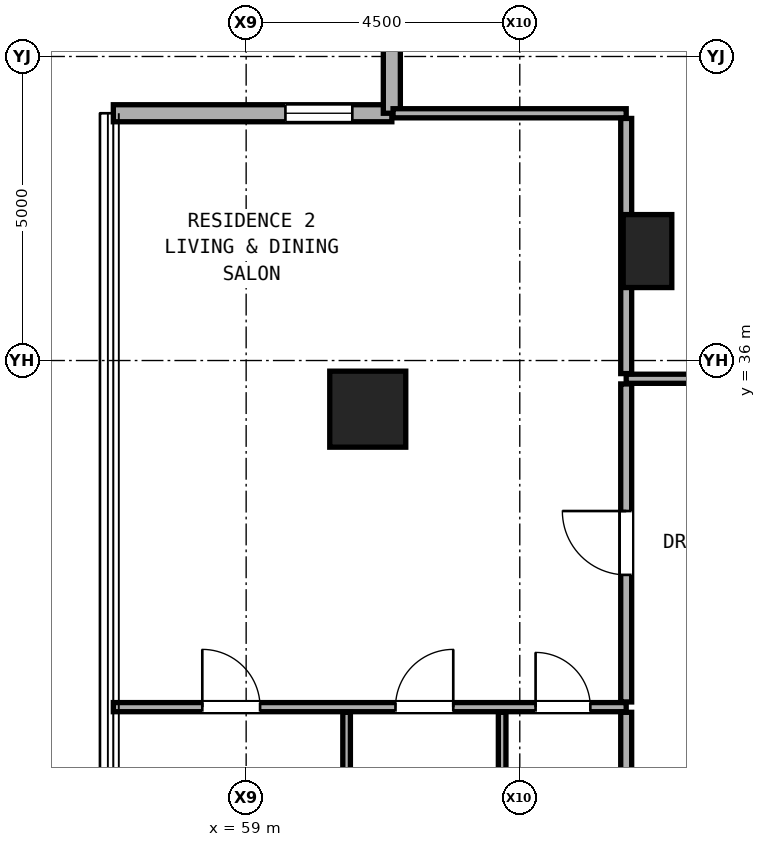
"""IFC4 building model, lengths in metres.
Left out: names, types, materials, properties, quantities, classifications, styles, units other than length and angle.
Written with IfcOpenShell. Run it as: python <this file> out.ifc"""

import sys

from ifc_helpers import new_model, si_unit, direction, frame, frame_2d, origin, origin_2d, place, context, subcontext, project, spatial, rectangle, hollow_rectangle, extrude, element, fill, save


model = new_model("IFC4")
c1 = context("Model", 3, precision=1e-05, world=origin(), true_north=direction((0.0, 1.0)))
c2 = subcontext(c1, "Body", "Model", "MODEL_VIEW")
j1 = project(units=[si_unit("LENGTHUNIT", "METRE"), si_unit("PLANEANGLEUNIT", "RADIAN")], contexts=[c1])
p1 = place(None, origin())
s1 = spatial("IfcSite", under=j1, at=p1, CompositionType="ELEMENT")
p2 = place(p1, origin())
s2 = spatial("IfcBuilding", under=s1, at=p2, CompositionType="ELEMENT")
p3 = place(p2, frame((0.0, 0.0, 48.8)))
s3 = spatial("IfcBuildingStorey", under=s2, at=p3, CompositionType="ELEMENT", Elevation=48.8)
p4 = place(p3, frame((61.0, 35.2, 0.0), z_axis=(0.0, 0.0, 1.0), x_axis=(1.0, 0.0, 0.0)))
e1 = element("IfcColumn", 1, at=p4, inside=s3, PredefinedType="COLUMN", context=c2, shape_type="SweptSolid", body=[
    extrude(hollow_rectangle(XDim=1.25, YDim=1.25, WallThickness=0.07, at=origin_2d()), origin(), (0.0, 0.0, 1.0), 3.3),
])
p5 = place(p3, frame((65.6, 37.8, 0.0), z_axis=(0.0, 0.0, 1.0), x_axis=(1.0, 0.0, 0.0)))
e2 = element("IfcColumn", 2, at=p5, inside=s3, PredefinedType="PILASTER", context=c2, shape_type="SweptSolid", body=[
    extrude(rectangle(XDim=0.8, YDim=1.2, at=origin_2d()), origin(), (0.0, 0.0, 1.0), 3.3),
])
p6 = place(p3, frame((61.396, 40.066, 0.0), z_axis=(0.0, 0.0, 1.0), x_axis=(-1.0, 0.0, 0.0)))
e3 = element("IfcWall", 3, at=p6, inside=s3, PredefinedType="SOLIDWALL", context=c2, shape_type="SweptSolid", body=[
    extrude(rectangle(XDim=4.58, YDim=0.28, at=frame_2d((2.29, 0.0))), origin(), (0.0, 0.0, 1.0), 3.04),
])
p7 = place(p6, frame((0.65, 0.0, 0.85)))
e4 = element("IfcOpeningElement", 4, at=p7, cuts=e3, PredefinedType="OPENING", context=c2, shape_type="SweptSolid", body=[
    extrude(rectangle(XDim=1.1, YDim=2.0, at=frame_2d((0.55, 1.0))), frame((0.0, 0.15, 0.0), z_axis=(0.0, -1.0, 0.0), x_axis=(1.0, 0.0, 0.0)), (0.0, 0.0, 1.0), 0.3),
])
p8 = place(p3, frame((61.396, 44.646, 0.0), z_axis=(0.0, 0.0, 1.0), x_axis=(0.0, -1.0, 0.0)))
e5 = element("IfcWall", 5, at=p8, inside=s3, PredefinedType="SOLIDWALL", context=c2, shape_type="SweptSolid", body=[
    extrude(rectangle(XDim=4.58, YDim=0.28, at=frame_2d((2.29, 0.0))), origin(), (0.0, 0.0, 1.0), 3.04),
])
p9 = place(p3, frame((56.816, 30.3, 0.0), z_axis=(0.0, 0.0, 1.0), x_axis=(1.0, 0.0, 0.0)))
e6 = element("IfcWall", 6, at=p9, inside=s3, PredefinedType="PARTITIONING", context=c2, shape_type="SweptSolid", body=[
    extrude(rectangle(XDim=8.434, YDim=0.15, at=frame_2d((4.217, 0.0))), origin(), (0.0, 0.0, 1.0), 2.196),
])
p10 = place(p9, frame((1.463, 0.0, 0.0)))
e7 = element("IfcOpeningElement", 7, at=p10, cuts=e6, PredefinedType="OPENING", context=c2, shape_type="SweptSolid", body=[
    extrude(rectangle(XDim=0.95, YDim=2.15, at=frame_2d((0.475, 1.075))), frame((0.0, 0.085, 0.0), z_axis=(0.0, -1.0, 0.0), x_axis=(1.0, 0.0, 0.0)), (0.0, 0.0, 1.0), 0.17),
])
p11 = place(p9, frame((4.64, 0.0, 0.0)))
e8 = element("IfcOpeningElement", 8, at=p11, cuts=e6, PredefinedType="OPENING", context=c2, shape_type="SweptSolid", body=[
    extrude(rectangle(XDim=0.95, YDim=2.15, at=frame_2d((0.475, 1.075))), frame((0.0, 0.085, 0.0), z_axis=(0.0, -1.0, 0.0), x_axis=(1.0, 0.0, 0.0)), (0.0, 0.0, 1.0), 0.17),
])
p12 = place(p9, frame((6.944, 0.0, 0.0)))
e9 = element("IfcOpeningElement", 9, at=p12, cuts=e6, PredefinedType="OPENING", context=c2, shape_type="SweptSolid", body=[
    extrude(rectangle(XDim=0.9, YDim=2.1, at=frame_2d((0.45, 1.05))), frame((0.0, 0.085, 0.0), z_axis=(0.0, -1.0, 0.0), x_axis=(1.0, 0.0, 0.0)), (0.0, 0.0, 1.0), 0.17),
])
p13 = place(p3, frame((65.25, 35.7, 0.0), z_axis=(0.0, 0.0, 1.0), x_axis=(1.0, 0.0, 0.0)))
e10 = element("IfcWall", 10, at=p13, inside=s3, PredefinedType="PARTITIONING", context=c2, shape_type="SweptSolid", body=[
    extrude(rectangle(XDim=1.37, YDim=0.15, at=frame_2d((0.685, 0.0))), origin(), (0.0, 0.0, 1.0), 3.06),
])
p14 = place(p3, frame((61.416, 40.066, 0.0), z_axis=(0.0, 0.0, 1.0), x_axis=(1.0, 0.0, 0.0)))
e11 = element("IfcWall", 11, at=p14, inside=s3, PredefinedType="PARTITIONING", context=c2, shape_type="SweptSolid", body=[
    extrude(rectangle(XDim=3.834, YDim=0.15, at=frame_2d((1.917, 0.0))), origin(), (0.0, 0.0, 1.0), 3.06),
])
p15 = place(p3, frame((60.652, 28.073, 0.0), z_axis=(0.0, 0.0, 1.0), x_axis=(0.0, 1.0, 0.0)))
e12 = element("IfcWall", 12, at=p15, inside=s3, PredefinedType="PARTITIONING", context=c2, shape_type="SweptSolid", body=[
    extrude(rectangle(XDim=2.143, YDim=0.125, at=frame_2d((1.071, 0.0))), origin(), (0.0, 0.0, 1.0), 3.06),
])
p16 = place(p3, frame((63.21, 28.073, 0.0), z_axis=(0.0, 0.0, 1.0), x_axis=(0.0, 1.0, 0.0)))
e13 = element("IfcWall", 13, at=p16, inside=s3, PredefinedType="PARTITIONING", context=c2, shape_type="SweptSolid", body=[
    extrude(rectangle(XDim=2.143, YDim=0.125, at=frame_2d((1.071, 0.0))), origin(), (0.0, 0.0, 1.0), 2.279),
])
p17 = place(p3, frame((65.25, 28.073, 0.0), z_axis=(0.0, 0.0, 1.0), x_axis=(0.0, 1.0, 0.0)))
e14 = element("IfcWall", 14, at=p17, inside=s3, PredefinedType="PARTITIONING", context=c2, shape_type="SweptSolid", body=[
    extrude(rectangle(XDim=2.143, YDim=0.18, at=frame_2d((1.071, 0.0))), origin(), (0.0, 0.0, 1.0), 2.279),
])
p18 = place(p3, frame((65.25, 30.385, 0.0), z_axis=(0.0, 0.0, 1.0), x_axis=(0.0, 1.0, 0.0)))
e15 = element("IfcWall", 15, at=p18, inside=s3, PredefinedType="PARTITIONING", context=c2, shape_type="SweptSolid", body=[
    extrude(rectangle(XDim=5.23, YDim=0.18, at=frame_2d((2.615, 0.0))), origin(), (0.0, 0.0, 1.0), 2.452),
])
p19 = place(p18, frame((2.09, 0.0, 0.0)))
e16 = element("IfcOpeningElement", 16, at=p19, cuts=e15, PredefinedType="OPENING", context=c2, shape_type="SweptSolid", body=[
    extrude(rectangle(XDim=1.05, YDim=2.2, at=frame_2d((0.525, 1.1))), frame((0.0, 0.1, 0.0), z_axis=(0.0, -1.0, 0.0), x_axis=(1.0, 0.0, 0.0)), (0.0, 0.0, 1.0), 0.2),
])
p20 = place(p3, frame((65.25, 35.785, 0.0), z_axis=(0.0, 0.0, 1.0), x_axis=(0.0, 1.0, 0.0)))
e17 = element("IfcWall", 17, at=p20, inside=s3, PredefinedType="PARTITIONING", context=c2, shape_type="SweptSolid", body=[
    extrude(rectangle(XDim=4.196, YDim=0.18, at=frame_2d((2.098, 0.0))), origin(), (0.0, 0.0, 1.0), 2.436),
])
p21 = place(p7, origin())
e18 = element("IfcWindow", 18, at=p21, inside=s3, PartitioningType="SINGLE_PANEL", PredefinedType="WINDOW", context=c2, shape_type="SweptSolid", body=[
    extrude(rectangle(XDim=1.1, YDim=2.0, at=frame_2d((0.55, 1.0))), frame((0.0, 0.03, 0.0), z_axis=(0.0, -1.0, 0.0), x_axis=(1.0, 0.0, 0.0)), (0.0, 0.0, 1.0), 0.06),
])
fill(e4, e18)
p22 = place(p19, origin())
e19 = element("IfcDoor", 19, at=p22, inside=s3, OperationType="SINGLE_SWING_RIGHT", PredefinedType="DOOR", context=c2, shape_type="SweptSolid", body=[
    extrude(rectangle(XDim=1.05, YDim=2.2, at=frame_2d((0.525, 1.1))), frame((0.0, 0.025, 0.0), z_axis=(0.0, -1.0, 0.0), x_axis=(1.0, 0.0, 0.0)), (0.0, 0.0, 1.0), 0.05),
])
fill(e16, e19)
p23 = place(p10, origin())
e20 = element("IfcDoor", 20, at=p23, inside=s3, OperationType="SINGLE_SWING_LEFT", PredefinedType="DOOR", context=c2, shape_type="SweptSolid", body=[
    extrude(rectangle(XDim=0.95, YDim=2.15, at=frame_2d((0.475, 1.075))), frame((0.0, 0.025, 0.0), z_axis=(0.0, -1.0, 0.0), x_axis=(1.0, 0.0, 0.0)), (0.0, 0.0, 1.0), 0.05),
])
fill(e7, e20)
p24 = place(p11, origin())
e21 = element("IfcDoor", 21, at=p24, inside=s3, OperationType="SINGLE_SWING_RIGHT", PredefinedType="DOOR", context=c2, shape_type="SweptSolid", body=[
    extrude(rectangle(XDim=0.95, YDim=2.15, at=frame_2d((0.475, 1.075))), frame((0.0, 0.025, 0.0), z_axis=(0.0, -1.0, 0.0), x_axis=(1.0, 0.0, 0.0)), (0.0, 0.0, 1.0), 0.05),
])
fill(e8, e21)
p25 = place(p12, origin())
e22 = element("IfcDoor", 22, at=p25, inside=s3, OperationType="SINGLE_SWING_LEFT", PredefinedType="DOOR", context=c2, shape_type="SweptSolid", body=[
    extrude(rectangle(XDim=0.9, YDim=2.1, at=frame_2d((0.45, 1.05))), frame((0.0, 0.025, 0.0), z_axis=(0.0, -1.0, 0.0), x_axis=(1.0, 0.0, 0.0)), (0.0, 0.0, 1.0), 0.05),
])
fill(e9, e22)
save(model, sys.argv[1])
